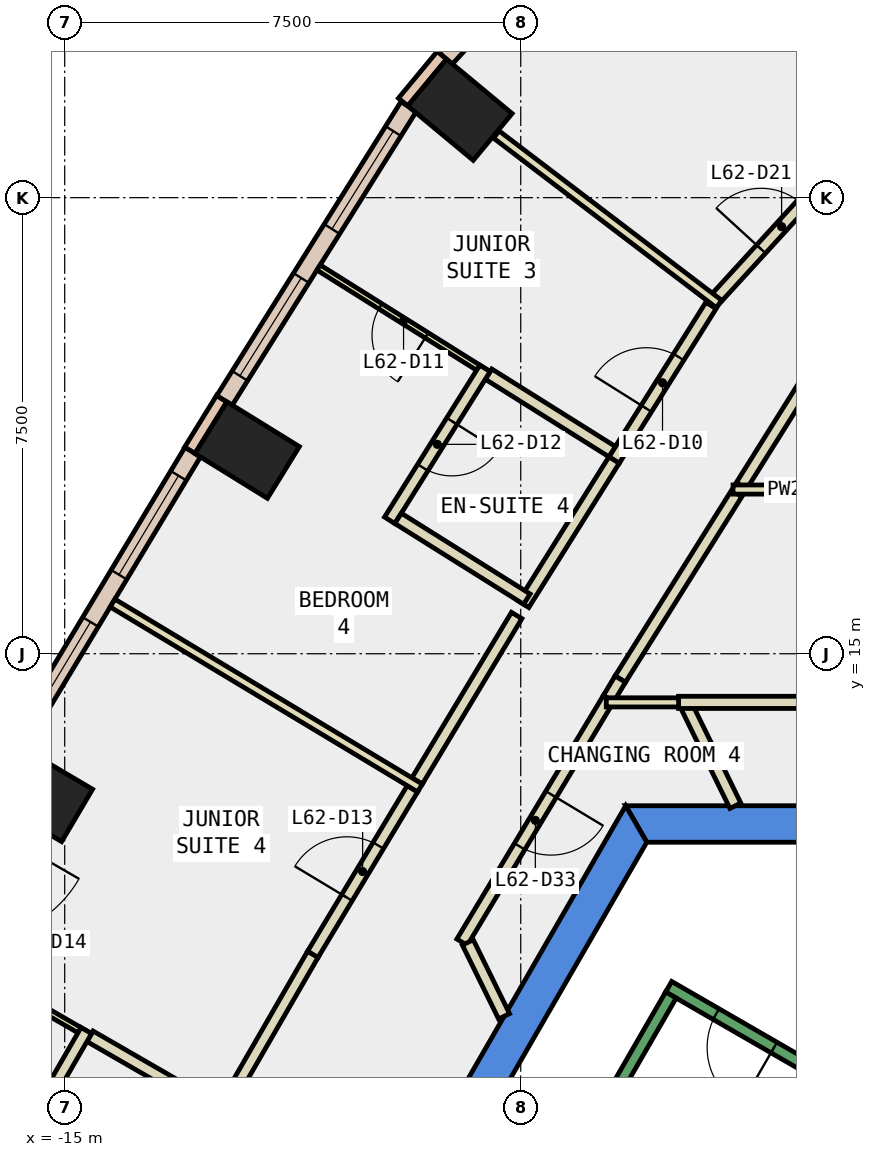
"""IFC4 building model, lengths in metres.
Left out: names, types, materials, properties, quantities, classifications, styles, units other than length and angle.
Written with IfcOpenShell. Run it as: python <this file> out.ifc"""

import sys

from ifc_helpers import new_model, si_unit, direction, frame, frame_2d, origin, origin_2d, place, context, subcontext, project, spatial, polyline, rectangle, outline, extrude, element, fill, save


model = new_model("IFC4")
c1 = context("Model", 3, precision=1e-05, world=origin(), true_north=direction((0.0, 1.0)))
c2 = subcontext(c1, "Body", "Model", "MODEL_VIEW")
j1 = project(units=[si_unit("LENGTHUNIT", "METRE"), si_unit("PLANEANGLEUNIT", "RADIAN")], contexts=[c1])
p1 = place(None, origin())
s1 = spatial("IfcSite", under=j1, at=p1, CompositionType="ELEMENT")
p2 = place(p1, origin())
s2 = spatial("IfcBuilding", under=s1, at=p2, CompositionType="ELEMENT")
p3 = place(p2, frame((0.0, 0.0, 270.2)))
s3 = spatial("IfcBuildingStorey", under=s2, at=p3, CompositionType="ELEMENT", Elevation=270.2)
for number, where, z_axis, x_axis in (
    (1, (-8.5, 23.946, -0.34), (0.0, 0.0, 1.0), (0.639, 0.769, 0.0)),
    (2, (-11.999, 18.349, -0.34), (0.0, 0.0, 1.0), (0.526, 0.851, 0.0)),
    (3, (-15.399, 12.697, -0.34), (0.0, 0.0, 1.0), (0.509, 0.861, 0.0)),
):
    element("IfcColumn", number, at=place(p3, frame(where, z_axis=z_axis, x_axis=x_axis)), inside=s3, PredefinedType="COLUMN", context=c2, shape_type="SweptSolid", body=[
        extrude(rectangle(XDim=1.0, YDim=1.4, at=origin_2d()), origin(), (0.0, 0.0, 1.0), 3.6),
    ])
p4 = place(p3, frame((0.0, 0.0, -0.34)))
e4 = element("IfcWall", 4, at=p4, inside=s3, PredefinedType="SHEAR", context=c2, shape_type="SweptSolid", body=[
    extrude(outline(polyline([(5.774, 12.5), (-5.774, 12.5), (-5.427, 11.9), (5.427, 11.9), (5.774, 12.5)])), origin(), (0.0, 0.0, 1.0), 3.6),
])
p5 = place(p3, frame((0.0, 0.0, -0.34)))
e5 = element("IfcWall", 5, at=p5, inside=s3, PredefinedType="SHEAR", context=c2, shape_type="SweptSolid", body=[
    extrude(outline(polyline([(-10.535, 4.253), (-10.015, 3.953), (-5.427, 11.9), (-5.774, 12.5), (-10.535, 4.253)])), origin(), (0.0, 0.0, 1.0), 3.6),
])
p6 = place(p3, frame((-8.796, 24.842, 0.0), z_axis=(0.0, 0.0, 1.0), x_axis=(-0.638117112481, -0.769939316283, 0.0)))
e6 = element("IfcWall", 6, at=p6, inside=s3, PredefinedType="STANDARD", context=c2, shape_type="SweptSolid", body=[
    extrude(rectangle(XDim=1.0, YDim=0.2, at=frame_2d((0.5, 0.0))), origin(), (0.0, 0.0, 1.0), 3.26),
])
p7 = place(p3, frame((-12.417, 19.195, 0.0), z_axis=(0.0, 0.0, 1.0), x_axis=(-0.525825307325, -0.850592585306, 0.0)))
e7 = element("IfcWall", 7, at=p7, inside=s3, PredefinedType="STANDARD", context=c2, shape_type="SweptSolid", body=[
    extrude(rectangle(XDim=1.0, YDim=0.2, at=frame_2d((0.5, 0.0))), origin(), (0.0, 0.0, 1.0), 3.26),
])
p8 = place(p3, frame((-5.782, 28.025, 0.0), z_axis=(0.0, 0.0, 1.0), x_axis=(-0.675143863554, -0.737686087374, 0.0)))
e8 = element("IfcWall", 8, at=p8, inside=s3, PredefinedType="STANDARD", context=c2, shape_type="SweptSolid", body=[
    extrude(rectangle(XDim=4.38, YDim=0.3, at=frame_2d((2.19, 0.0))), origin(), (0.0, 0.0, 1.0), 3.26),
])
p9 = place(p8, frame((1.49, 0.0, 0.9)))
e9 = element("IfcOpeningElement", 9, at=p9, cuts=e8, PredefinedType="OPENING", context=c2, shape_type="SweptSolid", body=[
    extrude(rectangle(XDim=1.4, YDim=2.0, at=frame_2d((0.7, 1.0))), frame((0.0, 0.16, 0.0), z_axis=(0.0, -1.0, 0.0), x_axis=(1.0, 0.0, 0.0)), (0.0, 0.0, 1.0), 0.32),
])
p10 = place(p3, frame((-9.343, 23.998, 0.0), z_axis=(0.0, 0.0, 1.0), x_axis=(-0.531137483242, -0.847285650708, 0.0)))
e10 = element("IfcWall", 10, at=p10, inside=s3, PredefinedType="STANDARD", context=c2, shape_type="SweptSolid", body=[
    extrude(rectangle(XDim=5.703, YDim=0.3, at=frame_2d((2.852, 0.0))), origin(), (0.0, 0.0, 1.0), 3.26),
])
p11 = place(p10, frame((0.476, 0.0, 0.9)))
e11 = element("IfcOpeningElement", 11, at=p11, cuts=e10, PredefinedType="OPENING", context=c2, shape_type="SweptSolid", body=[
    extrude(rectangle(XDim=1.9, YDim=2.0, at=frame_2d((0.95, 1.0))), frame((0.0, 0.16, 0.0), z_axis=(0.0, -1.0, 0.0), x_axis=(1.0, 0.0, 0.0)), (0.0, 0.0, 1.0), 0.32),
])
p12 = place(p10, frame((3.327, 0.0, 0.9)))
e12 = element("IfcOpeningElement", 12, at=p12, cuts=e10, PredefinedType="OPENING", context=c2, shape_type="SweptSolid", body=[
    extrude(rectangle(XDim=1.9, YDim=2.0, at=frame_2d((0.95, 1.0))), frame((0.0, 0.16, 0.0), z_axis=(0.0, -1.0, 0.0), x_axis=(1.0, 0.0, 0.0)), (0.0, 0.0, 1.0), 0.32),
])
p13 = place(p3, frame((-12.895, 18.316, 0.0), z_axis=(0.0, 0.0, 1.0), x_axis=(-0.515435742129, -0.856928232547, 0.0)))
e13 = element("IfcWall", 13, at=p13, inside=s3, PredefinedType="STANDARD", context=c2, shape_type="SweptSolid", body=[
    extrude(rectangle(XDim=5.613, YDim=0.3, at=frame_2d((2.806, 0.0))), origin(), (0.0, 0.0, 1.0), 3.26),
])
p14 = place(p13, frame((0.453, 0.0, 0.9)))
e14 = element("IfcOpeningElement", 14, at=p14, cuts=e13, PredefinedType="OPENING", context=c2, shape_type="SweptSolid", body=[
    extrude(rectangle(XDim=1.9, YDim=2.0, at=frame_2d((0.95, 1.0))), frame((0.0, 0.16, 0.0), z_axis=(0.0, -1.0, 0.0), x_axis=(1.0, 0.0, 0.0)), (0.0, 0.0, 1.0), 0.32),
])
p15 = place(p13, frame((3.26, 0.0, 0.9)))
e15 = element("IfcOpeningElement", 15, at=p15, cuts=e13, PredefinedType="OPENING", context=c2, shape_type="SweptSolid", body=[
    extrude(rectangle(XDim=1.9, YDim=2.0, at=frame_2d((0.95, 1.0))), frame((0.0, 0.16, 0.0), z_axis=(0.0, -1.0, 0.0), x_axis=(1.0, 0.0, 0.0)), (0.0, 0.0, 1.0), 0.32),
])
p16 = place(p3, frame((-3.97, 12.5, 0.0), z_axis=(0.0, 0.0, 1.0), x_axis=(-0.440355460167, 0.89782351757, 0.0)))
e16 = element("IfcWall", 16, at=p16, inside=s3, PredefinedType="PARTITIONING", context=c2, shape_type="SweptSolid", body=[
    extrude(rectangle(XDim=1.869, YDim=0.2, at=frame_2d((0.935, 0.0))), origin(), (0.0, 0.0, 1.0), 3.26),
])
p17 = place(p3, frame((-6.054, 14.264, 0.0), z_axis=(0.0, 0.0, 1.0), x_axis=(-0.515508653897, -0.856884372455, 0.0)))
e17 = element("IfcWall", 17, at=p17, inside=s3, PredefinedType="PARTITIONING", context=c2, shape_type="SweptSolid", body=[
    extrude(rectangle(XDim=4.677, YDim=0.2, at=frame_2d((2.339, 0.0))), origin(), (0.0, 0.0, 1.0), 3.26),
])
p18 = place(p17, frame((1.839, 0.0, 0.0)))
e18 = element("IfcOpeningElement", 18, at=p18, cuts=e17, PredefinedType="OPENING", context=c2, shape_type="SweptSolid", body=[
    extrude(rectangle(XDim=1.0, YDim=2.1, at=frame_2d((0.5, 1.05))), frame((0.0, 0.11, 0.0), z_axis=(0.0, -1.0, 0.0), x_axis=(1.0, 0.0, 0.0)), (0.0, 0.0, 1.0), 0.22),
])
p19 = place(p3, frame((-8.37, 10.252, 0.0), z_axis=(0.0, 0.0, 1.0), x_axis=(0.440562172885, -0.897722101668, 0.0)))
e19 = element("IfcWall", 19, at=p19, inside=s3, PredefinedType="PARTITIONING", context=c2, shape_type="SweptSolid", body=[
    extrude(rectangle(XDim=1.353, YDim=0.2, at=frame_2d((0.677, 0.0))), origin(), (0.0, 0.0, 1.0), 3.26),
])
p20 = place(p3, frame((-4.904, 14.2, 0.0), z_axis=(0.0, 0.0, 1.0), x_axis=(1.0, 0.0, 0.0)))
e20 = element("IfcWall", 20, at=p20, inside=s3, PredefinedType="PARTITIONING", context=c2, shape_type="SweptSolid", body=[
    extrude(rectangle(XDim=4.504, YDim=0.2, at=frame_2d((2.252, 0.0))), origin(), (0.0, 0.0, 1.0), 3.26),
])
p21 = place(p3, frame((-3.948, 17.636, 0.0), z_axis=(0.0, 0.0, 1.0), x_axis=(-0.531380509042, -0.847133256702, 0.0)))
e21 = element("IfcWall", 21, at=p21, inside=s3, PredefinedType="PARTITIONING", context=c2, shape_type="SweptSolid", body=[
    extrude(rectangle(XDim=3.604, YDim=0.2, at=frame_2d((1.802, 0.0))), origin(), (0.0, 0.0, 1.0), 3.26),
])
p22 = place(p3, frame((-5.863, 14.583, 0.0), z_axis=(0.0, 0.0, 1.0), x_axis=(-0.513433271491, -0.858129521533, 0.0)))
e22 = element("IfcWall", 22, at=p22, inside=s3, PredefinedType="PARTITIONING", context=c2, shape_type="SweptSolid", body=[
    extrude(rectangle(XDim=0.372, YDim=0.2, at=frame_2d((0.186, 0.0))), origin(), (0.0, 0.0, 1.0), 3.26),
])
p23 = place(p3, frame((-2.773, 19.511, 0.0), z_axis=(0.0, 0.0, 1.0), x_axis=(-0.531062870102, -0.847332418829, 0.0)))
e23 = element("IfcWall", 23, at=p23, inside=s3, PredefinedType="PARTITIONING", context=c2, shape_type="SweptSolid", body=[
    extrude(rectangle(XDim=2.062, YDim=0.2, at=frame_2d((1.031, 0.0))), origin(), (0.0, 0.0, 1.0), 3.26),
])
p24 = place(p3, frame((-4.335, 20.793, 0.0), z_axis=(0.0, 0.0, 1.0), x_axis=(0.675074517272, 0.737749548377, 0.0)))
e24 = element("IfcWall", 24, at=p24, inside=s3, PredefinedType="PARTITIONING", context=c2, shape_type="SweptSolid", body=[
    extrude(rectangle(XDim=3.334, YDim=0.2, at=frame_2d((1.667, 0.0))), origin(), (0.0, 0.0, 1.0), 3.26),
])
p25 = place(p24, frame((1.167, 0.0, 0.0)))
e25 = element("IfcOpeningElement", 25, at=p25, cuts=e24, PredefinedType="OPENING", context=c2, shape_type="SweptSolid", body=[
    extrude(rectangle(XDim=1.0, YDim=2.1, at=frame_2d((0.5, 1.05))), frame((0.0, 0.11, 0.0), z_axis=(0.0, -1.0, 0.0), x_axis=(1.0, 0.0, 0.0)), (0.0, 0.0, 1.0), 0.22),
])
p26 = place(p3, frame((-5.965, 18.185, 0.0), z_axis=(0.0, 0.0, 1.0), x_axis=(0.531256372055, 0.847211111324, 0.0)))
e26 = element("IfcWall", 26, at=p26, inside=s3, PredefinedType="PARTITIONING", context=c2, shape_type="SweptSolid", body=[
    extrude(rectangle(XDim=3.0, YDim=0.2, at=frame_2d((1.5, 0.0))), origin(), (0.0, 0.0, 1.0), 3.26),
])
p27 = place(p26, frame((1.0, 0.0, 0.0)))
e27 = element("IfcOpeningElement", 27, at=p27, cuts=e26, PredefinedType="OPENING", context=c2, shape_type="SweptSolid", body=[
    extrude(rectangle(XDim=1.0, YDim=2.1, at=frame_2d((0.5, 1.05))), frame((0.0, 0.11, 0.0), z_axis=(0.0, -1.0, 0.0), x_axis=(1.0, 0.0, 0.0)), (0.0, 0.0, 1.0), 0.22),
])
p28 = place(p3, frame((-9.204, 12.908, 0.0), z_axis=(0.0, 0.0, 1.0), x_axis=(0.51556943596, 0.856847802532, 0.0)))
e28 = element("IfcWall", 28, at=p28, inside=s3, PredefinedType="PARTITIONING", context=c2, shape_type="SweptSolid", body=[
    extrude(rectangle(XDim=3.176, YDim=0.2, at=frame_2d((1.588, 0.0))), origin(), (0.0, 0.0, 1.0), 3.26),
])
p29 = place(p3, frame((-7.452, 15.813, 0.0), z_axis=(0.0, 0.0, 1.0), x_axis=(0.531095943551, 0.847311689252, 0.0)))
e29 = element("IfcWall", 29, at=p29, inside=s3, PredefinedType="PARTITIONING", context=c2, shape_type="SweptSolid", body=[
    extrude(rectangle(XDim=2.8, YDim=0.2, at=frame_2d((1.4, 0.0))), origin(), (0.0, 0.0, 1.0), 3.26),
])
p30 = place(p3, frame((-12.469, 7.373, 0.0), z_axis=(0.0, 0.0, 1.0), x_axis=(0.500129289791, 0.86595074542, 0.0)))
e30 = element("IfcWall", 30, at=p30, inside=s3, PredefinedType="PARTITIONING", context=c2, shape_type="SweptSolid", body=[
    extrude(rectangle(XDim=3.099, YDim=0.2, at=frame_2d((1.55, 0.0))), origin(), (0.0, 0.0, 1.0), 3.26),
])
p31 = place(p3, frame((-10.919, 10.057, 0.0), z_axis=(0.0, 0.0, 1.0), x_axis=(0.515568955032, 0.856848091908, 0.0)))
e31 = element("IfcWall", 31, at=p31, inside=s3, PredefinedType="PARTITIONING", context=c2, shape_type="SweptSolid", body=[
    extrude(rectangle(XDim=3.177, YDim=0.2, at=frame_2d((1.588, 0.0))), origin(), (0.0, 0.0, 1.0), 3.26),
])
p32 = place(p31, frame((1.088, 0.0, 0.0)))
e32 = element("IfcOpeningElement", 32, at=p32, cuts=e31, PredefinedType="OPENING", context=c2, shape_type="SweptSolid", body=[
    extrude(rectangle(XDim=1.0, YDim=2.1, at=frame_2d((0.5, 1.05))), frame((0.0, 0.11, 0.0), z_axis=(0.0, -1.0, 0.0), x_axis=(1.0, 0.0, 0.0)), (0.0, 0.0, 1.0), 0.22),
])
p33 = place(p3, frame((-4.904, 14.2, 0.0), z_axis=(0.0, 0.0, 1.0), x_axis=(-1.0, 0.0, 0.0)))
e33 = element("IfcWall", 33, at=p33, inside=s3, PredefinedType="PARTITIONING", context=c2, shape_type="SweptSolid", body=[
    extrude(rectangle(XDim=1.189, YDim=0.15, at=frame_2d((0.594, 0.0))), origin(), (0.0, 0.0, 1.0), 3.26),
])
p34 = place(p3, frame((-4.008, 17.7, 0.0), z_axis=(0.0, 0.0, 1.0), x_axis=(1.0, 0.0, 0.0)))
e34 = element("IfcWall", 34, at=p34, inside=s3, PredefinedType="PARTITIONING", context=c2, shape_type="SweptSolid", body=[
    extrude(rectangle(XDim=3.608, YDim=0.15, at=frame_2d((1.804, 0.0))), origin(), (0.0, 0.0, 1.0), 3.26),
])
p35 = place(p3, frame((-4.238, 20.751, 0.0), z_axis=(0.0, 0.0, 1.0), x_axis=(-0.795806473987, 0.605551034976, 0.0)))
e35 = element("IfcWall", 35, at=p35, inside=s3, PredefinedType="PARTITIONING", context=c2, shape_type="SweptSolid", body=[
    extrude(rectangle(XDim=4.604, YDim=0.15, at=frame_2d((2.302, 0.0))), origin(), (0.0, 0.0, 1.0), 3.26),
])
p36 = place(p3, frame((-8.029, 19.598, 0.0), z_axis=(0.0, 0.0, 1.0), x_axis=(-0.847216023371, 0.531248538581, 0.0)))
e36 = element("IfcWall", 36, at=p36, inside=s3, PredefinedType="PARTITIONING", context=c2, shape_type="SweptSolid", body=[
    extrude(rectangle(XDim=3.3, YDim=0.1, at=frame_2d((1.65, 0.0))), origin(), (0.0, 0.0, 1.0), 3.26),
])
p37 = place(p36, frame((1.2, 0.0, 0.0)))
e37 = element("IfcOpeningElement", 37, at=p37, cuts=e36, PredefinedType="OPENING", context=c2, shape_type="SweptSolid", body=[
    extrude(rectangle(XDim=0.9, YDim=2.1, at=frame_2d((0.45, 1.05))), frame((0.0, 0.06, 0.0), z_axis=(0.0, -1.0, 0.0), x_axis=(1.0, 0.0, 0.0)), (0.0, 0.0, 1.0), 0.12),
])
p38 = place(p3, frame((-5.996, 18.323, 0.0), z_axis=(0.0, 0.0, 1.0), x_axis=(-0.847191403331, 0.531287799711, 0.0)))
e38 = element("IfcWall", 38, at=p38, inside=s3, PredefinedType="PARTITIONING", context=c2, shape_type="SweptSolid", body=[
    extrude(rectangle(XDim=2.4, YDim=0.2, at=frame_2d((1.2, 0.0))), origin(), (0.0, 0.0, 1.0), 3.26),
])
p39 = place(p3, frame((-8.088, 19.693, 0.0), z_axis=(0.0, 0.0, 1.0), x_axis=(-0.531277961984, -0.847197572654, 0.0)))
e39 = element("IfcWall", 39, at=p39, inside=s3, PredefinedType="PARTITIONING", context=c2, shape_type="SweptSolid", body=[
    extrude(rectangle(XDim=2.95, YDim=0.2, at=frame_2d((1.475, 0.0))), origin(), (0.0, 0.0, 1.0), 3.26),
])
p40 = place(p39, frame((1.025, 0.0, 0.0)))
e40 = element("IfcOpeningElement", 40, at=p40, cuts=e39, PredefinedType="OPENING", context=c2, shape_type="SweptSolid", body=[
    extrude(rectangle(XDim=0.9, YDim=2.1, at=frame_2d((0.45, 1.05))), frame((0.0, 0.11, 0.0), z_axis=(0.0, -1.0, 0.0), x_axis=(1.0, 0.0, 0.0)), (0.0, 0.0, 1.0), 0.22),
])
p41 = place(p3, frame((-9.517, 17.226, 0.0), z_axis=(0.0, 0.0, 1.0), x_axis=(0.847229363594, -0.53122726348, 0.0)))
e41 = element("IfcWall", 41, at=p41, inside=s3, PredefinedType="PARTITIONING", context=c2, shape_type="SweptSolid", body=[
    extrude(rectangle(XDim=2.5, YDim=0.2, at=frame_2d((1.25, 0.0))), origin(), (0.0, 0.0, 1.0), 3.26),
])
p42 = place(p3, frame((-9.157, 12.792, 0.0), z_axis=(0.0, 0.0, 1.0), x_axis=(-0.856933793276, 0.515426497129, 0.0)))
e42 = element("IfcWall", 42, at=p42, inside=s3, PredefinedType="PARTITIONING", context=c2, shape_type="SweptSolid", body=[
    extrude(rectangle(XDim=5.9, YDim=0.15, at=frame_2d((2.95, 0.0))), origin(), (0.0, 0.0, 1.0), 3.26),
])
p43 = place(p3, frame((-14.584, 8.71, 0.0), z_axis=(0.0, 0.0, 1.0), x_axis=(-0.866008176907, 0.50002983664, 0.0)))
e43 = element("IfcWall", 43, at=p43, inside=s3, PredefinedType="PARTITIONING", context=c2, shape_type="SweptSolid", body=[
    extrude(rectangle(XDim=3.3, YDim=0.1, at=frame_2d((1.65, 0.0))), origin(), (0.0, 0.0, 1.0), 3.26),
])
p44 = place(p43, frame((1.2, 0.0, 0.0)))
e44 = element("IfcOpeningElement", 44, at=p44, cuts=e43, PredefinedType="OPENING", context=c2, shape_type="SweptSolid", body=[
    extrude(rectangle(XDim=0.9, YDim=2.1, at=frame_2d((0.45, 1.05))), frame((0.0, 0.06, 0.0), z_axis=(0.0, -1.0, 0.0), x_axis=(1.0, 0.0, 0.0)), (0.0, 0.0, 1.0), 0.12),
])
p45 = place(p3, frame((-12.505, 7.51, 0.0), z_axis=(0.0, 0.0, 1.0), x_axis=(-0.866277021052, 0.499563932643, 0.0)))
e45 = element("IfcWall", 45, at=p45, inside=s3, PredefinedType="PARTITIONING", context=c2, shape_type="SweptSolid", body=[
    extrude(rectangle(XDim=2.4, YDim=0.2, at=frame_2d((1.2, 0.0))), origin(), (0.0, 0.0, 1.0), 3.26),
])
p46 = place(p3, frame((-14.645, 8.803, 0.0), z_axis=(0.0, 0.0, 1.0), x_axis=(-0.500001826776, -0.866024349092, 0.0)))
e46 = element("IfcWall", 46, at=p46, inside=s3, PredefinedType="PARTITIONING", context=c2, shape_type="SweptSolid", body=[
    extrude(rectangle(XDim=2.95, YDim=0.2, at=frame_2d((1.475, 0.0))), origin(), (0.0, 0.0, 1.0), 3.26),
])
p47 = place(p46, frame((1.025, 0.0, 0.0)))
e47 = element("IfcOpeningElement", 47, at=p47, cuts=e46, PredefinedType="OPENING", context=c2, shape_type="SweptSolid", body=[
    extrude(rectangle(XDim=0.9, YDim=2.1, at=frame_2d((0.45, 1.05))), frame((0.0, 0.11, 0.0), z_axis=(0.0, -1.0, 0.0), x_axis=(1.0, 0.0, 0.0)), (0.0, 0.0, 1.0), 0.22),
])
p48 = place(p3, frame((-1.256, 7.324, 0.0), z_axis=(0.0, 0.0, 1.0), x_axis=(-0.866046073146, 0.499964197906, 0.0)))
e48 = element("IfcWall", 48, at=p48, inside=s3, PredefinedType="STANDARD", context=c2, shape_type="SweptSolid", body=[
    extrude(rectangle(XDim=4.4, YDim=0.2, at=frame_2d((2.2, 0.0))), origin(), (0.0, 0.0, 1.0), 3.26),
])
p49 = place(p48, frame((2.4, 0.0, 0.0)))
e49 = element("IfcOpeningElement", 49, at=p49, cuts=e48, PredefinedType="OPENING", context=c2, shape_type="SweptSolid", body=[
    extrude(rectangle(XDim=1.1, YDim=2.2, at=frame_2d((0.55, 1.1))), frame((0.0, 0.11, 0.0), z_axis=(0.0, -1.0, 0.0), x_axis=(1.0, 0.0, 0.0)), (0.0, 0.0, 1.0), 0.22),
])
p50 = place(p3, frame((-5.03, 9.388, 0.0), z_axis=(0.0, 0.0, 1.0), x_axis=(-0.499978703459, -0.866037698999, 0.0)))
e50 = element("IfcWall", 50, at=p50, inside=s3, PredefinedType="STANDARD", context=c2, shape_type="SweptSolid", body=[
    extrude(rectangle(XDim=6.9, YDim=0.2, at=frame_2d((3.45, 0.0))), origin(), (0.0, 0.0, 1.0), 3.26),
])
p51 = place(p11, origin())
e51 = element("IfcWindow", 51, at=p51, inside=s3, PartitioningType="SINGLE_PANEL", PredefinedType="WINDOW", context=c2, shape_type="SweptSolid", body=[
    extrude(rectangle(XDim=1.9, YDim=2.0, at=frame_2d((0.95, 1.0))), frame((0.0, 0.03, 0.0), z_axis=(0.0, -1.0, 0.0), x_axis=(1.0, 0.0, 0.0)), (0.0, 0.0, 1.0), 0.06),
])
fill(e11, e51)
p52 = place(p12, origin())
e52 = element("IfcWindow", 52, at=p52, inside=s3, PartitioningType="SINGLE_PANEL", PredefinedType="WINDOW", context=c2, shape_type="SweptSolid", body=[
    extrude(rectangle(XDim=1.9, YDim=2.0, at=frame_2d((0.95, 1.0))), frame((0.0, 0.03, 0.0), z_axis=(0.0, -1.0, 0.0), x_axis=(1.0, 0.0, 0.0)), (0.0, 0.0, 1.0), 0.06),
])
fill(e12, e52)
p53 = place(p14, origin())
e53 = element("IfcWindow", 53, at=p53, inside=s3, PartitioningType="SINGLE_PANEL", PredefinedType="WINDOW", context=c2, shape_type="SweptSolid", body=[
    extrude(rectangle(XDim=1.9, YDim=2.0, at=frame_2d((0.95, 1.0))), frame((0.0, 0.03, 0.0), z_axis=(0.0, -1.0, 0.0), x_axis=(1.0, 0.0, 0.0)), (0.0, 0.0, 1.0), 0.06),
])
fill(e14, e53)
p54 = place(p15, origin())
e54 = element("IfcWindow", 54, at=p54, inside=s3, PartitioningType="SINGLE_PANEL", PredefinedType="WINDOW", context=c2, shape_type="SweptSolid", body=[
    extrude(rectangle(XDim=1.9, YDim=2.0, at=frame_2d((0.95, 1.0))), frame((0.0, 0.03, 0.0), z_axis=(0.0, -1.0, 0.0), x_axis=(1.0, 0.0, 0.0)), (0.0, 0.0, 1.0), 0.06),
])
fill(e15, e54)
p55 = place(p27, origin())
e55 = element("IfcDoor", 55, at=p55, inside=s3, OperationType="SINGLE_SWING_LEFT", PredefinedType="DOOR", context=c2, shape_type="SweptSolid", body=[
    extrude(rectangle(XDim=1.0, YDim=2.1, at=frame_2d((0.5, 1.05))), frame((0.0, 0.025, 0.0), z_axis=(0.0, -1.0, 0.0), x_axis=(1.0, 0.0, 0.0)), (0.0, 0.0, 1.0), 0.05),
])
fill(e27, e55)
p56 = place(p37, origin())
e56 = element("IfcDoor", 56, at=p56, inside=s3, OperationType="SINGLE_SWING_RIGHT", PredefinedType="DOOR", context=c2, shape_type="SweptSolid", body=[
    extrude(rectangle(XDim=0.9, YDim=2.1, at=frame_2d((0.45, 1.05))), frame((0.0, 0.025, 0.0), z_axis=(0.0, -1.0, 0.0), x_axis=(1.0, 0.0, 0.0)), (0.0, 0.0, 1.0), 0.05),
])
fill(e37, e56)
p57 = place(p40, origin())
e57 = element("IfcDoor", 57, at=p57, inside=s3, OperationType="SINGLE_SWING_LEFT", PredefinedType="DOOR", context=c2, shape_type="SweptSolid", body=[
    extrude(rectangle(XDim=0.9, YDim=2.1, at=frame_2d((0.45, 1.05))), frame((0.0, 0.025, 0.0), z_axis=(0.0, -1.0, 0.0), x_axis=(1.0, 0.0, 0.0)), (0.0, 0.0, 1.0), 0.05),
])
fill(e40, e57)
p58 = place(p32, origin())
e58 = element("IfcDoor", 58, at=p58, inside=s3, OperationType="SINGLE_SWING_LEFT", PredefinedType="DOOR", context=c2, shape_type="SweptSolid", body=[
    extrude(rectangle(XDim=1.0, YDim=2.1, at=frame_2d((0.5, 1.05))), frame((0.0, 0.025, 0.0), z_axis=(0.0, -1.0, 0.0), x_axis=(1.0, 0.0, 0.0)), (0.0, 0.0, 1.0), 0.05),
])
fill(e32, e58)
p59 = place(p25, origin())
e59 = element("IfcDoor", 59, at=p59, inside=s3, OperationType="SINGLE_SWING_LEFT", PredefinedType="DOOR", context=c2, shape_type="SweptSolid", body=[
    extrude(rectangle(XDim=1.0, YDim=2.1, at=frame_2d((0.5, 1.05))), frame((0.0, 0.025, 0.0), z_axis=(0.0, -1.0, 0.0), x_axis=(1.0, 0.0, 0.0)), (0.0, 0.0, 1.0), 0.05),
])
fill(e25, e59)
p60 = place(p18, origin())
e60 = element("IfcDoor", 60, at=p60, inside=s3, OperationType="SINGLE_SWING_LEFT", PredefinedType="DOOR", context=c2, shape_type="SweptSolid", body=[
    extrude(rectangle(XDim=1.0, YDim=2.1, at=frame_2d((0.5, 1.05))), frame((0.0, 0.025, 0.0), z_axis=(0.0, -1.0, 0.0), x_axis=(1.0, 0.0, 0.0)), (0.0, 0.0, 1.0), 0.05),
])
fill(e18, e60)
p61 = place(p49, origin())
e61 = element("IfcDoor", 61, at=p61, inside=s3, OperationType="SINGLE_SWING_LEFT", PredefinedType="DOOR", context=c2, shape_type="SweptSolid", body=[
    extrude(rectangle(XDim=1.1, YDim=2.2, at=frame_2d((0.55, 1.1))), frame((0.0, 0.025, 0.0), z_axis=(0.0, -1.0, 0.0), x_axis=(1.0, 0.0, 0.0)), (0.0, 0.0, 1.0), 0.05),
])
fill(e49, e61)
save(model, sys.argv[1])
